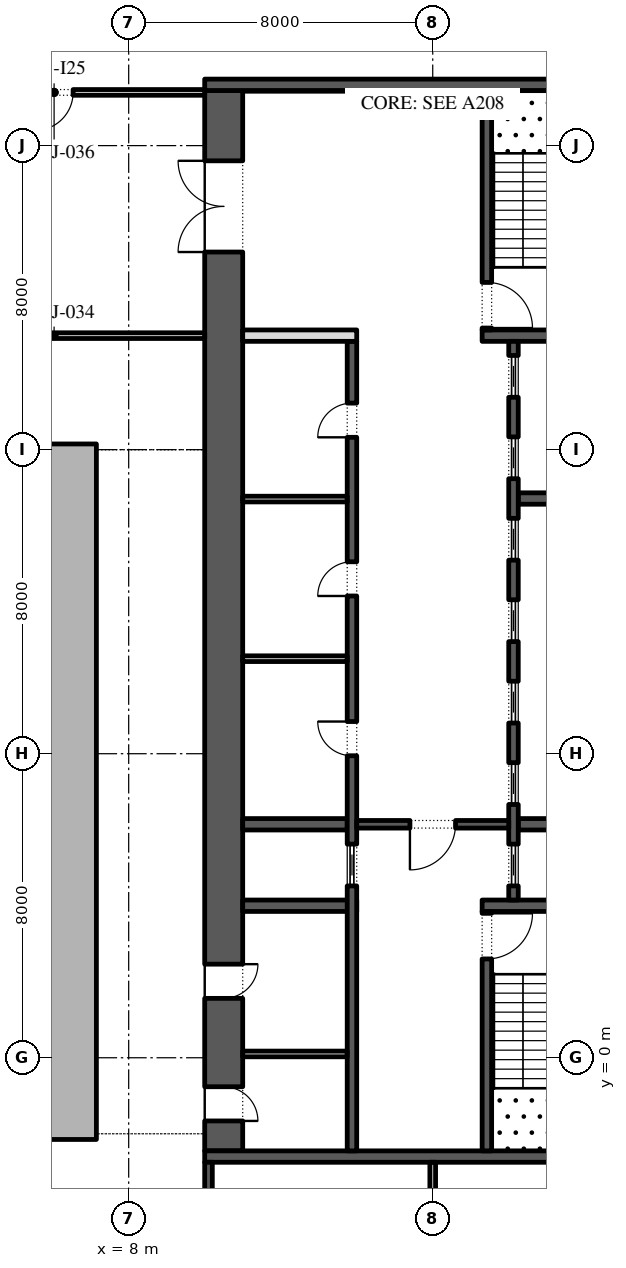
"""IFC4 building model, lengths in metres.
Left out: names, types, materials, properties, quantities, classifications, styles, units other than length and angle.
Written with IfcOpenShell. Run it as: python <this file> out.ifc"""

import sys

from ifc_helpers import new_model, si_unit, direction, frame, frame_2d, origin, place, context, subcontext, project, spatial, polyline, rectangle, outline, extrude, element, fill, save


model = new_model("IFC4")
c1 = context("Model", 3, precision=1e-05, world=origin(), true_north=direction((0.0, 1.0)))
c2 = subcontext(c1, "Body", "Model", "MODEL_VIEW")
j1 = project(units=[si_unit("LENGTHUNIT", "METRE"), si_unit("PLANEANGLEUNIT", "RADIAN")], contexts=[c1])
p1 = place(None, origin())
s1 = spatial("IfcSite", under=j1, at=p1, CompositionType="ELEMENT")
p2 = place(p1, origin())
s2 = spatial("IfcBuilding", under=s1, at=p2, CompositionType="ELEMENT")
p3 = place(p2, frame((0.0, 0.0, 28.8)))
s3 = spatial("IfcBuildingStorey", under=s2, at=p3, CompositionType="ELEMENT", Elevation=28.8)
p4 = place(p3, origin())
e1 = element("IfcWall", 1, at=p4, inside=s3, PredefinedType="STANDARD", context=c2, shape_type="SweptSolid", body=[
    extrude(outline(polyline([(-7.15, -2.15), (7.15, -2.15), (7.15, 16.15), (-7.15, 16.15), (-7.15, -2.15)]), holes=[polyline([(-7.0, -2.0), (-7.0, 16.0), (7.0, 16.0), (7.0, -2.0), (-7.0, -2.0)])]), origin(), (0.0, 0.0, 1.0), 4.35),
])
p5 = place(p3, frame((10.5, -2.45, 0.0), z_axis=(0.0, 0.0, 1.0), x_axis=(0.0, 1.0, 0.0)))
e2 = element("IfcWall", 2, at=p5, inside=s3, PredefinedType="SHEAR", context=c2, shape_type="SweptSolid", body=[
    extrude(rectangle(XDim=27.9, YDim=1.0, at=frame_2d((13.95, 0.0))), origin(), (0.0, 0.0, 1.0), 4.35),
])
p6 = place(p5, frame((23.65, 0.0, 0.0)))
e3 = element("IfcOpeningElement", 3, at=p6, cuts=e2, PredefinedType="OPENING", context=c2, shape_type="SweptSolid", body=[
    extrude(rectangle(XDim=2.4, YDim=2.1, at=frame_2d((1.2, 1.05))), frame((0.0, 0.51, 0.0), z_axis=(0.0, -1.0, 0.0), x_axis=(1.0, 0.0, 0.0)), (0.0, 0.0, 1.0), 1.02),
])
p7 = place(p5, frame((0.788, 0.0, 0.0)))
e4 = element("IfcOpeningElement", 4, at=p7, cuts=e2, PredefinedType="OPENING", context=c2, shape_type="SweptSolid", body=[
    extrude(rectangle(XDim=0.9, YDim=2.1, at=frame_2d((0.45, 1.05))), frame((0.0, 0.51, 0.0), z_axis=(0.0, -1.0, 0.0), x_axis=(1.0, 0.0, 0.0)), (0.0, 0.0, 1.0), 1.02),
])
p8 = place(p5, frame((4.012, 0.0, 0.0)))
e5 = element("IfcOpeningElement", 5, at=p8, cuts=e2, PredefinedType="OPENING", context=c2, shape_type="SweptSolid", body=[
    extrude(rectangle(XDim=0.9, YDim=2.1, at=frame_2d((0.45, 1.05))), frame((0.0, 0.51, 0.0), z_axis=(0.0, -1.0, 0.0), x_axis=(1.0, 0.0, 0.0)), (0.0, 0.0, 1.0), 1.02),
])
for number, where, z_axis, x_axis in (
    (6, (10.0, -2.6, 0.0), (0.0, 0.0, 1.0), (1.0, 0.0, 0.0)),
    (7, (10.0, 25.6, 0.0), (0.0, 0.0, 1.0), (1.0, 0.0, 0.0)),
):
    element("IfcWall", number, at=place(p3, frame(where, z_axis=z_axis, x_axis=x_axis)), inside=s3, PredefinedType="SHEAR", context=c2, shape_type="SweptSolid", body=[
        extrude(rectangle(XDim=12.0, YDim=0.3, at=frame_2d((6.0, 0.0))), origin(), (0.0, 0.0, 1.0), 4.35),
    ])
p9 = place(p3, frame((17.3, 4.0, 0.0), z_axis=(0.0, 0.0, 1.0), x_axis=(1.0, 0.0, 0.0)))
e8 = element("IfcWall", 8, at=p9, inside=s3, PredefinedType="SHEAR", context=c2, shape_type="SweptSolid", body=[
    extrude(rectangle(XDim=3.7, YDim=0.3, at=frame_2d((1.85, 0.0))), origin(), (0.0, 0.0, 1.0), 4.35),
])
p10 = place(p3, frame((17.425, -2.45, 0.0), z_axis=(0.0, 0.0, 1.0), x_axis=(0.0, 1.0, 0.0)))
e9 = element("IfcWall", 9, at=p10, inside=s3, PredefinedType="SHEAR", context=c2, shape_type="SweptSolid", body=[
    extrude(rectangle(XDim=6.3, YDim=0.25, at=frame_2d((3.15, 0.0))), origin(), (0.0, 0.0, 1.0), 4.35),
])
p11 = place(p10, frame((5.05, 0.0, 0.0)))
e10 = element("IfcOpeningElement", 10, at=p11, cuts=e9, PredefinedType="OPENING", context=c2, shape_type="SweptSolid", body=[
    extrude(rectangle(XDim=1.2, YDim=2.1, at=frame_2d((0.6, 1.05))), frame((0.0, 0.135, 0.0), z_axis=(0.0, -1.0, 0.0), x_axis=(1.0, 0.0, 0.0)), (0.0, 0.0, 1.0), 0.27),
])
p12 = place(p3, frame((17.3, 19.0, 0.0), z_axis=(0.0, 0.0, 1.0), x_axis=(1.0, 0.0, 0.0)))
e11 = element("IfcWall", 11, at=p12, inside=s3, PredefinedType="SHEAR", context=c2, shape_type="SweptSolid", body=[
    extrude(rectangle(XDim=3.7, YDim=0.3, at=frame_2d((1.85, 0.0))), origin(), (0.0, 0.0, 1.0), 4.35),
])
p13 = place(p3, frame((17.425, 19.15, 0.0), z_axis=(0.0, 0.0, 1.0), x_axis=(0.0, 1.0, 0.0)))
e12 = element("IfcWall", 12, at=p13, inside=s3, PredefinedType="SHEAR", context=c2, shape_type="SweptSolid", body=[
    extrude(rectangle(XDim=6.3, YDim=0.25, at=frame_2d((3.15, 0.0))), origin(), (0.0, 0.0, 1.0), 4.35),
])
p14 = place(p13, frame((0.05, 0.0, 0.0)))
e13 = element("IfcOpeningElement", 13, at=p14, cuts=e12, PredefinedType="OPENING", context=c2, shape_type="SweptSolid", body=[
    extrude(rectangle(XDim=1.2, YDim=2.1, at=frame_2d((0.6, 1.05))), frame((0.0, 0.135, 0.0), z_axis=(0.0, -1.0, 0.0), x_axis=(1.0, 0.0, 0.0)), (0.0, 0.0, 1.0), 0.27),
])
for number, where, z_axis, x_axis in (
    (14, (18.25, 6.143, 0.0), (0.0, 0.0, 1.0), (1.0, 0.0, 0.0)),
    (15, (18.25, 14.714, 0.0), (0.0, 0.0, 1.0), (1.0, 0.0, 0.0)),
):
    element("IfcWall", number, at=place(p3, frame(where, z_axis=z_axis, x_axis=x_axis)), inside=s3, PredefinedType="SHEAR", context=c2, shape_type="SweptSolid", body=[
        extrude(rectangle(XDim=2.75, YDim=0.3, at=frame_2d((1.375, 0.0))), origin(), (0.0, 0.0, 1.0), 4.35),
    ])
p15 = place(p3, frame((18.125, 4.15, 0.0), z_axis=(0.0, 0.0, 1.0), x_axis=(0.0, 1.0, 0.0)))
e16 = element("IfcWall", 16, at=p15, inside=s3, PredefinedType="SHEAR", context=c2, shape_type="SweptSolid", body=[
    extrude(rectangle(XDim=14.7, YDim=0.25, at=frame_2d((7.35, 0.0))), origin(), (0.0, 0.0, 1.0), 4.35),
])
p16 = place(p15, frame((0.371, 0.0, 0.0)))
e17 = element("IfcOpeningElement", 17, at=p16, cuts=e16, PredefinedType="OPENING", context=c2, shape_type="SweptSolid", body=[
    extrude(rectangle(XDim=1.1, YDim=2.1, at=frame_2d((0.55, 1.05))), frame((0.0, 0.135, 0.0), z_axis=(0.0, -1.0, 0.0), x_axis=(1.0, 0.0, 0.0)), (0.0, 0.0, 1.0), 0.27),
])
p17 = place(p15, frame((2.514, 0.0, 0.0)))
e18 = element("IfcOpeningElement", 18, at=p17, cuts=e16, PredefinedType="OPENING", context=c2, shape_type="SweptSolid", body=[
    extrude(rectangle(XDim=1.1, YDim=2.1, at=frame_2d((0.55, 1.05))), frame((0.0, 0.135, 0.0), z_axis=(0.0, -1.0, 0.0), x_axis=(1.0, 0.0, 0.0)), (0.0, 0.0, 1.0), 0.27),
])
p18 = place(p15, frame((4.657, 0.0, 0.0)))
e19 = element("IfcOpeningElement", 19, at=p18, cuts=e16, PredefinedType="OPENING", context=c2, shape_type="SweptSolid", body=[
    extrude(rectangle(XDim=1.1, YDim=2.1, at=frame_2d((0.55, 1.05))), frame((0.0, 0.135, 0.0), z_axis=(0.0, -1.0, 0.0), x_axis=(1.0, 0.0, 0.0)), (0.0, 0.0, 1.0), 0.27),
])
p19 = place(p15, frame((6.8, 0.0, 0.0)))
e20 = element("IfcOpeningElement", 20, at=p19, cuts=e16, PredefinedType="OPENING", context=c2, shape_type="SweptSolid", body=[
    extrude(rectangle(XDim=1.1, YDim=2.1, at=frame_2d((0.55, 1.05))), frame((0.0, 0.135, 0.0), z_axis=(0.0, -1.0, 0.0), x_axis=(1.0, 0.0, 0.0)), (0.0, 0.0, 1.0), 0.27),
])
p20 = place(p15, frame((8.943, 0.0, 0.0)))
e21 = element("IfcOpeningElement", 21, at=p20, cuts=e16, PredefinedType="OPENING", context=c2, shape_type="SweptSolid", body=[
    extrude(rectangle(XDim=1.1, YDim=2.1, at=frame_2d((0.55, 1.05))), frame((0.0, 0.135, 0.0), z_axis=(0.0, -1.0, 0.0), x_axis=(1.0, 0.0, 0.0)), (0.0, 0.0, 1.0), 0.27),
])
p21 = place(p15, frame((11.086, 0.0, 0.0)))
e22 = element("IfcOpeningElement", 22, at=p21, cuts=e16, PredefinedType="OPENING", context=c2, shape_type="SweptSolid", body=[
    extrude(rectangle(XDim=1.1, YDim=2.1, at=frame_2d((0.55, 1.05))), frame((0.0, 0.135, 0.0), z_axis=(0.0, -1.0, 0.0), x_axis=(1.0, 0.0, 0.0)), (0.0, 0.0, 1.0), 0.27),
])
p22 = place(p15, frame((13.229, 0.0, 0.0)))
e23 = element("IfcOpeningElement", 23, at=p22, cuts=e16, PredefinedType="OPENING", context=c2, shape_type="SweptSolid", body=[
    extrude(rectangle(XDim=1.1, YDim=2.1, at=frame_2d((0.55, 1.05))), frame((0.0, 0.135, 0.0), z_axis=(0.0, -1.0, 0.0), x_axis=(1.0, 0.0, 0.0)), (0.0, 0.0, 1.0), 0.27),
])
p23 = place(p3, frame((11.0, 4.0, 0.0), z_axis=(0.0, 0.0, 1.0), x_axis=(1.0, 0.0, 0.0)))
e24 = element("IfcWall", 24, at=p23, inside=s3, PredefinedType="SHEAR", context=c2, shape_type="SweptSolid", body=[
    extrude(rectangle(XDim=3.0, YDim=0.3, at=frame_2d((1.5, 0.0))), origin(), (0.0, 0.0, 1.0), 4.35),
])
p24 = place(p3, frame((11.0, 6.143, 0.0), z_axis=(0.0, 0.0, 1.0), x_axis=(1.0, 0.0, 0.0)))
e25 = element("IfcWall", 25, at=p24, inside=s3, PredefinedType="SHEAR", context=c2, shape_type="SweptSolid", body=[
    extrude(rectangle(XDim=2.75, YDim=0.3, at=frame_2d((1.375, 0.0))), origin(), (0.0, 0.0, 1.0), 4.35),
])
p25 = place(p3, frame((13.875, -2.45, 0.0), z_axis=(0.0, 0.0, 1.0), x_axis=(0.0, 1.0, 0.0)))
e26 = element("IfcWall", 26, at=p25, inside=s3, PredefinedType="SHEAR", context=c2, shape_type="SweptSolid", body=[
    extrude(rectangle(XDim=21.3, YDim=0.25, at=frame_2d((10.65, 0.0))), origin(), (0.0, 0.0, 1.0), 4.35),
])
p26 = place(p25, frame((10.396, 0.0, 0.0)))
e27 = element("IfcOpeningElement", 27, at=p26, cuts=e26, PredefinedType="OPENING", context=c2, shape_type="SweptSolid", body=[
    extrude(rectangle(XDim=0.9, YDim=2.1, at=frame_2d((0.45, 1.05))), frame((0.0, 0.135, 0.0), z_axis=(0.0, -1.0, 0.0), x_axis=(1.0, 0.0, 0.0)), (0.0, 0.0, 1.0), 0.27),
])
p27 = place(p25, frame((14.6, 0.0, 0.0)))
e28 = element("IfcOpeningElement", 28, at=p27, cuts=e26, PredefinedType="OPENING", context=c2, shape_type="SweptSolid", body=[
    extrude(rectangle(XDim=0.9, YDim=2.1, at=frame_2d((0.45, 1.05))), frame((0.0, 0.135, 0.0), z_axis=(0.0, -1.0, 0.0), x_axis=(1.0, 0.0, 0.0)), (0.0, 0.0, 1.0), 0.27),
])
p28 = place(p25, frame((18.775, 0.0, 0.0)))
e29 = element("IfcOpeningElement", 29, at=p28, cuts=e26, PredefinedType="OPENING", context=c2, shape_type="SweptSolid", body=[
    extrude(rectangle(XDim=0.9, YDim=2.1, at=frame_2d((0.45, 1.05))), frame((0.0, 0.135, 0.0), z_axis=(0.0, -1.0, 0.0), x_axis=(1.0, 0.0, 0.0)), (0.0, 0.0, 1.0), 0.27),
])
p29 = place(p25, frame((6.971, 0.0, 0.0)))
e30 = element("IfcOpeningElement", 30, at=p29, cuts=e26, PredefinedType="OPENING", context=c2, shape_type="SweptSolid", body=[
    extrude(rectangle(XDim=1.1, YDim=2.1, at=frame_2d((0.55, 1.05))), frame((0.0, 0.135, 0.0), z_axis=(0.0, -1.0, 0.0), x_axis=(1.0, 0.0, 0.0)), (0.0, 0.0, 1.0), 0.27),
])
p30 = place(p3, frame((11.0, 19.0, 0.0), z_axis=(0.0, 0.0, 1.0), x_axis=(1.0, 0.0, 0.0)))
e31 = element("IfcWall", 31, at=p30, inside=s3, PredefinedType="PARTITIONING", context=c2, shape_type="SweptSolid", body=[
    extrude(rectangle(XDim=3.0, YDim=0.3, at=frame_2d((1.5, 0.0))), origin(), (0.0, 0.0, 1.0), 4.35),
])
for number, where, z_axis, x_axis in (
    (32, (11.0, 10.5, 0.0), (0.0, 0.0, 1.0), (1.0, 0.0, 0.0)),
    (33, (11.0, 14.7, 0.0), (0.0, 0.0, 1.0), (1.0, 0.0, 0.0)),
):
    element("IfcWall", number, at=place(p3, frame(where, z_axis=z_axis, x_axis=x_axis)), inside=s3, PredefinedType="PARTITIONING", context=c2, shape_type="SweptSolid", body=[
        extrude(rectangle(XDim=2.75, YDim=0.15, at=frame_2d((1.375, 0.0))), origin(), (0.0, 0.0, 1.0), 4.35),
    ])
p31 = place(p3, frame((14.0, 6.143, 0.0), z_axis=(0.0, 0.0, 1.0), x_axis=(1.0, 0.0, 0.0)))
e34 = element("IfcWall", 34, at=p31, inside=s3, PredefinedType="SHEAR", context=c2, shape_type="SweptSolid", body=[
    extrude(rectangle(XDim=4.0, YDim=0.2, at=frame_2d((2.0, 0.0))), origin(), (0.0, 0.0, 1.0), 4.35),
])
p32 = place(p31, frame((1.4, 0.0, 0.0)))
e35 = element("IfcOpeningElement", 35, at=p32, cuts=e34, PredefinedType="OPENING", context=c2, shape_type="SweptSolid", body=[
    extrude(rectangle(XDim=1.2, YDim=2.1, at=frame_2d((0.6, 1.05))), frame((0.0, 0.11, 0.0), z_axis=(0.0, -1.0, 0.0), x_axis=(1.0, 0.0, 0.0)), (0.0, 0.0, 1.0), 0.22),
])
p33 = place(p3, frame((11.0, 0.1, 0.0), z_axis=(0.0, 0.0, 1.0), x_axis=(1.0, 0.0, 0.0)))
e36 = element("IfcWall", 36, at=p33, inside=s3, PredefinedType="PARTITIONING", context=c2, shape_type="SweptSolid", body=[
    extrude(rectangle(XDim=2.75, YDim=0.15, at=frame_2d((1.375, 0.0))), origin(), (0.0, 0.0, 1.0), 4.35),
])
p34 = place(p3, frame((10.1, -15.8, 0.0), z_axis=(0.0, 0.0, 1.0), x_axis=(0.0, 1.0, 0.0)))
e37 = element("IfcWall", 37, at=p34, inside=s3, PredefinedType="SHEAR", context=c2, shape_type="SweptSolid", body=[
    extrude(rectangle(XDim=13.05, YDim=0.2, at=frame_2d((6.525, 0.0))), origin(), (0.0, 0.0, 1.0), 4.35),
])
p35 = place(p34, frame((6.075, 0.0, 0.0)))
e38 = element("IfcOpeningElement", 38, at=p35, cuts=e37, PredefinedType="OPENING", context=c2, shape_type="SweptSolid", body=[
    extrude(rectangle(XDim=0.9, YDim=2.1, at=frame_2d((0.45, 1.05))), frame((0.0, 0.11, 0.0), z_axis=(0.0, -1.0, 0.0), x_axis=(1.0, 0.0, 0.0)), (0.0, 0.0, 1.0), 0.22),
])
p36 = place(p3, frame((16.0, -15.8, 0.0), z_axis=(0.0, 0.0, 1.0), x_axis=(0.0, 1.0, 0.0)))
e39 = element("IfcWall", 39, at=p36, inside=s3, PredefinedType="PARTITIONING", context=c2, shape_type="SweptSolid", body=[
    extrude(rectangle(XDim=13.05, YDim=0.15, at=frame_2d((6.525, 0.0))), origin(), (0.0, 0.0, 1.0), 4.35),
])
p37 = place(p36, frame((11.087, 0.0, 0.0)))
e40 = element("IfcOpeningElement", 40, at=p37, cuts=e39, PredefinedType="OPENING", context=c2, shape_type="SweptSolid", body=[
    extrude(rectangle(XDim=0.9, YDim=2.1, at=frame_2d((0.45, 1.05))), frame((0.0, 0.085, 0.0), z_axis=(0.0, -1.0, 0.0), x_axis=(1.0, 0.0, 0.0)), (0.0, 0.0, 1.0), 0.17),
])
p38 = place(p3, frame((2.075, 19.0, 0.0), z_axis=(0.0, 0.0, 1.0), x_axis=(1.0, 0.0, 0.0)))
e41 = element("IfcWall", 41, at=p38, inside=s3, PredefinedType="PARTITIONING", context=c2, shape_type="SweptSolid", body=[
    extrude(rectangle(XDim=7.925, YDim=0.15, at=frame_2d((3.962, 0.0))), origin(), (0.0, 0.0, 1.0), 4.35),
])
p39 = place(p3, frame((2.075, 25.4, 0.0), z_axis=(0.0, 0.0, 1.0), x_axis=(1.0, 0.0, 0.0)))
e42 = element("IfcWall", 42, at=p39, inside=s3, PredefinedType="PARTITIONING", context=c2, shape_type="SweptSolid", body=[
    extrude(rectangle(XDim=7.925, YDim=0.15, at=frame_2d((3.962, 0.0))), origin(), (0.0, 0.0, 1.0), 4.35),
])
p40 = place(p39, frame((3.462, 0.0, 0.0)))
e43 = element("IfcOpeningElement", 43, at=p40, cuts=e42, PredefinedType="OPENING", context=c2, shape_type="SweptSolid", body=[
    extrude(rectangle(XDim=1.0, YDim=2.1, at=frame_2d((0.5, 1.05))), frame((0.0, 0.085, 0.0), z_axis=(0.0, -1.0, 0.0), x_axis=(1.0, 0.0, 0.0)), (0.0, 0.0, 1.0), 0.17),
])
p41 = place(p16, origin())
e44 = element("IfcDoor", 44, at=p41, inside=s3, OperationType="SLIDING_TO_LEFT", PredefinedType="DOOR", context=c2, shape_type="SweptSolid", body=[
    extrude(rectangle(XDim=1.1, YDim=2.1, at=frame_2d((0.55, 1.05))), frame((0.0, 0.025, 0.0), z_axis=(0.0, -1.0, 0.0), x_axis=(1.0, 0.0, 0.0)), (0.0, 0.0, 1.0), 0.05),
])
fill(e17, e44)
p42 = place(p17, origin())
e45 = element("IfcDoor", 45, at=p42, inside=s3, OperationType="SLIDING_TO_LEFT", PredefinedType="DOOR", context=c2, shape_type="SweptSolid", body=[
    extrude(rectangle(XDim=1.1, YDim=2.1, at=frame_2d((0.55, 1.05))), frame((0.0, 0.025, 0.0), z_axis=(0.0, -1.0, 0.0), x_axis=(1.0, 0.0, 0.0)), (0.0, 0.0, 1.0), 0.05),
])
fill(e18, e45)
p43 = place(p18, origin())
e46 = element("IfcDoor", 46, at=p43, inside=s3, OperationType="SLIDING_TO_LEFT", PredefinedType="DOOR", context=c2, shape_type="SweptSolid", body=[
    extrude(rectangle(XDim=1.1, YDim=2.1, at=frame_2d((0.55, 1.05))), frame((0.0, 0.025, 0.0), z_axis=(0.0, -1.0, 0.0), x_axis=(1.0, 0.0, 0.0)), (0.0, 0.0, 1.0), 0.05),
])
fill(e19, e46)
p44 = place(p19, origin())
e47 = element("IfcDoor", 47, at=p44, inside=s3, OperationType="SLIDING_TO_LEFT", PredefinedType="DOOR", context=c2, shape_type="SweptSolid", body=[
    extrude(rectangle(XDim=1.1, YDim=2.1, at=frame_2d((0.55, 1.05))), frame((0.0, 0.025, 0.0), z_axis=(0.0, -1.0, 0.0), x_axis=(1.0, 0.0, 0.0)), (0.0, 0.0, 1.0), 0.05),
])
fill(e20, e47)
p45 = place(p20, origin())
e48 = element("IfcDoor", 48, at=p45, inside=s3, OperationType="SLIDING_TO_LEFT", PredefinedType="DOOR", context=c2, shape_type="SweptSolid", body=[
    extrude(rectangle(XDim=1.1, YDim=2.1, at=frame_2d((0.55, 1.05))), frame((0.0, 0.025, 0.0), z_axis=(0.0, -1.0, 0.0), x_axis=(1.0, 0.0, 0.0)), (0.0, 0.0, 1.0), 0.05),
])
fill(e21, e48)
p46 = place(p21, origin())
e49 = element("IfcDoor", 49, at=p46, inside=s3, OperationType="SLIDING_TO_LEFT", PredefinedType="DOOR", context=c2, shape_type="SweptSolid", body=[
    extrude(rectangle(XDim=1.1, YDim=2.1, at=frame_2d((0.55, 1.05))), frame((0.0, 0.025, 0.0), z_axis=(0.0, -1.0, 0.0), x_axis=(1.0, 0.0, 0.0)), (0.0, 0.0, 1.0), 0.05),
])
fill(e22, e49)
p47 = place(p22, origin())
e50 = element("IfcDoor", 50, at=p47, inside=s3, OperationType="SLIDING_TO_LEFT", PredefinedType="DOOR", context=c2, shape_type="SweptSolid", body=[
    extrude(rectangle(XDim=1.1, YDim=2.1, at=frame_2d((0.55, 1.05))), frame((0.0, 0.025, 0.0), z_axis=(0.0, -1.0, 0.0), x_axis=(1.0, 0.0, 0.0)), (0.0, 0.0, 1.0), 0.05),
])
fill(e23, e50)
p48 = place(p26, origin())
e51 = element("IfcDoor", 51, at=p48, inside=s3, OperationType="SINGLE_SWING_LEFT", PredefinedType="DOOR", context=c2, shape_type="SweptSolid", body=[
    extrude(rectangle(XDim=0.9, YDim=2.1, at=frame_2d((0.45, 1.05))), frame((0.0, 0.125, 0.0), z_axis=(0.0, -1.0, 0.0), x_axis=(1.0, 0.0, 0.0)), (0.0, 0.0, 1.0), 0.05),
])
fill(e27, e51)
p49 = place(p27, origin())
e52 = element("IfcDoor", 52, at=p49, inside=s3, OperationType="SINGLE_SWING_RIGHT", PredefinedType="DOOR", context=c2, shape_type="SweptSolid", body=[
    extrude(rectangle(XDim=0.9, YDim=2.1, at=frame_2d((0.45, 1.05))), frame((0.0, 0.125, 0.0), z_axis=(0.0, -1.0, 0.0), x_axis=(1.0, 0.0, 0.0)), (0.0, 0.0, 1.0), 0.05),
])
fill(e28, e52)
p50 = place(p28, origin())
e53 = element("IfcDoor", 53, at=p50, inside=s3, OperationType="SINGLE_SWING_RIGHT", PredefinedType="DOOR", context=c2, shape_type="SweptSolid", body=[
    extrude(rectangle(XDim=0.9, YDim=2.1, at=frame_2d((0.45, 1.05))), frame((0.0, 0.125, 0.0), z_axis=(0.0, -1.0, 0.0), x_axis=(1.0, 0.0, 0.0)), (0.0, 0.0, 1.0), 0.05),
])
fill(e29, e53)
p51 = place(p29, origin())
e54 = element("IfcDoor", 54, at=p51, inside=s3, OperationType="SLIDING_TO_LEFT", PredefinedType="DOOR", context=c2, shape_type="SweptSolid", body=[
    extrude(rectangle(XDim=1.1, YDim=2.1, at=frame_2d((0.55, 1.05))), frame((0.0, 0.025, 0.0), z_axis=(0.0, -1.0, 0.0), x_axis=(1.0, 0.0, 0.0)), (0.0, 0.0, 1.0), 0.05),
])
fill(e30, e54)
p52 = place(p32, frame((1.2, 0.0, 0.0), z_axis=(0.0, 0.0, 1.0), x_axis=(-1.0, 0.0, 0.0)))
e55 = element("IfcDoor", 55, at=p52, inside=s3, OperationType="SINGLE_SWING_LEFT", PredefinedType="DOOR", context=c2, shape_type="SweptSolid", body=[
    extrude(rectangle(XDim=1.2, YDim=2.1, at=frame_2d((0.6, 1.05))), frame((0.0, 0.025, 0.0), z_axis=(0.0, -1.0, 0.0), x_axis=(1.0, 0.0, 0.0)), (0.0, 0.0, 1.0), 0.05),
])
fill(e35, e55)
p53 = place(p6, origin())
e56 = element("IfcDoor", 56, at=p53, inside=s3, OperationType="DOUBLE_DOOR_SINGLE_SWING", PredefinedType="DOOR", context=c2, shape_type="SweptSolid", body=[
    extrude(rectangle(XDim=2.4, YDim=2.1, at=frame_2d((1.2, 1.05))), frame((0.0, 0.025, 0.0), z_axis=(0.0, -1.0, 0.0), x_axis=(1.0, 0.0, 0.0)), (0.0, 0.0, 1.0), 0.05),
])
fill(e3, e56)
p54 = place(p11, frame((1.2, 0.0, 0.0), z_axis=(0.0, 0.0, 1.0), x_axis=(-1.0, 0.0, 0.0)))
e57 = element("IfcDoor", 57, at=p54, inside=s3, OperationType="SINGLE_SWING_RIGHT", PredefinedType="DOOR", context=c2, shape_type="SweptSolid", body=[
    extrude(rectangle(XDim=1.2, YDim=2.1, at=frame_2d((0.6, 1.05))), frame((0.0, 0.025, 0.0), z_axis=(0.0, -1.0, 0.0), x_axis=(1.0, 0.0, 0.0)), (0.0, 0.0, 1.0), 0.05),
])
fill(e10, e57)
p55 = place(p14, frame((1.2, 0.0, 0.0), z_axis=(0.0, 0.0, 1.0), x_axis=(-1.0, 0.0, 0.0)))
e58 = element("IfcDoor", 58, at=p55, inside=s3, OperationType="SINGLE_SWING_LEFT", PredefinedType="DOOR", context=c2, shape_type="SweptSolid", body=[
    extrude(rectangle(XDim=1.2, YDim=2.1, at=frame_2d((0.6, 1.05))), frame((0.0, 0.025, 0.0), z_axis=(0.0, -1.0, 0.0), x_axis=(1.0, 0.0, 0.0)), (0.0, 0.0, 1.0), 0.05),
])
fill(e13, e58)
p56 = place(p7, frame((0.9, -0.95, 0.0), z_axis=(0.0, 0.0, 1.0), x_axis=(-1.0, 0.0, 0.0)))
e59 = element("IfcDoor", 59, at=p56, inside=s3, OperationType="SINGLE_SWING_LEFT", PredefinedType="DOOR", context=c2, shape_type="SweptSolid", body=[
    extrude(rectangle(XDim=0.9, YDim=2.1, at=frame_2d((0.45, 1.05))), frame((0.0, -0.45, 0.0), z_axis=(0.0, -1.0, 0.0), x_axis=(1.0, 0.0, 0.0)), (0.0, 0.0, 1.0), 0.05),
])
fill(e4, e59)
p57 = place(p8, frame((0.9, -0.95, 0.0), z_axis=(0.0, 0.0, 1.0), x_axis=(-1.0, 0.0, 0.0)))
e60 = element("IfcDoor", 60, at=p57, inside=s3, OperationType="SINGLE_SWING_RIGHT", PredefinedType="DOOR", context=c2, shape_type="SweptSolid", body=[
    extrude(rectangle(XDim=0.9, YDim=2.1, at=frame_2d((0.45, 1.05))), frame((0.0, -0.45, 0.0), z_axis=(0.0, -1.0, 0.0), x_axis=(1.0, 0.0, 0.0)), (0.0, 0.0, 1.0), 0.05),
])
fill(e5, e60)
p58 = place(p40, frame((1.0, 0.0, 0.0), z_axis=(0.0, 0.0, 1.0), x_axis=(-1.0, 0.0, 0.0)))
e61 = element("IfcDoor", 61, at=p58, inside=s3, OperationType="SINGLE_SWING_LEFT", PredefinedType="DOOR", context=c2, shape_type="SweptSolid", body=[
    extrude(rectangle(XDim=1.0, YDim=2.1, at=frame_2d((0.5, 1.05))), frame((0.0, 0.025, 0.0), z_axis=(0.0, -1.0, 0.0), x_axis=(1.0, 0.0, 0.0)), (0.0, 0.0, 1.0), 0.05),
])
fill(e43, e61)
save(model, sys.argv[1])
